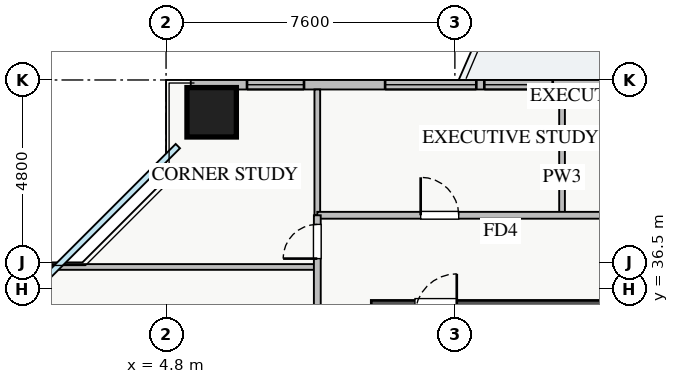
"""IFC4 building model, lengths in metres.
Left out: names, types, materials, properties, quantities, classifications, styles, units other than length and angle.
Written with IfcOpenShell. Run it as: python <this file> out.ifc"""

import sys

from ifc_helpers import new_model, si_unit, direction, frame, frame_2d, origin, origin_2d, place, context, subcontext, project, spatial, rectangle, extrude, source, transform, mapped, element, fill, save


model = new_model("IFC4")
c1 = context("Model", 3, precision=1e-05, world=origin(), true_north=direction((0.0, 1.0)))
c2 = subcontext(c1, "Body", "Model", "MODEL_VIEW")
j1 = project(units=[si_unit("LENGTHUNIT", "METRE"), si_unit("PLANEANGLEUNIT", "RADIAN")], contexts=[c1])
p1 = place(None, origin())
s1 = spatial("IfcSite", under=j1, at=p1, CompositionType="ELEMENT")
p2 = place(p1, origin())
s2 = spatial("IfcBuilding", under=s1, at=p2, CompositionType="ELEMENT")
p3 = place(p2, frame((0.0, 0.0, 69.75)))
s3 = spatial("IfcBuildingStorey", under=s2, at=p3, CompositionType="ELEMENT", Elevation=69.75)
p4 = place(p3, frame((10.2, 35.8, 0.0), z_axis=(0.0, 0.0, 1.0), x_axis=(1.0, 0.0, 0.0)))
e1 = element("IfcWall", 1, at=p4, inside=s3, PredefinedType="SHEAR", context=c2, shape_type="SweptSolid", body=[
    extrude(rectangle(XDim=17.6, YDim=0.8, at=frame_2d((8.8, 0.0))), origin(), (0.0, 0.0, 1.0), 3.25),
])
p5 = place(p4, frame((1.15, 0.0, 0.0)))
e2 = element("IfcOpeningElement", 2, at=p5, cuts=e1, PredefinedType="OPENING", context=c2, shape_type="SweptSolid", body=[
    extrude(rectangle(XDim=1.1, YDim=2.05, at=frame_2d((0.55, 1.025))), frame((0.0, 0.41, 0.0), z_axis=(0.0, -1.0, 0.0), x_axis=(1.0, 0.0, 0.0)), (0.0, 0.0, 1.0), 0.82),
])
p6 = place(p4, frame((8.3, 0.0, 0.0)))
e3 = element("IfcOpeningElement", 3, at=p6, cuts=e1, PredefinedType="OPENING", context=c2, shape_type="SweptSolid", body=[
    extrude(rectangle(XDim=1.1, YDim=2.05, at=frame_2d((0.55, 1.025))), frame((0.0, 0.41, 0.0), z_axis=(0.0, -1.0, 0.0), x_axis=(1.0, 0.0, 0.0)), (0.0, 0.0, 1.0), 0.82),
])
p7 = place(p4, frame((10.05, 0.0, 0.0)))
e4 = element("IfcOpeningElement", 4, at=p7, cuts=e1, PredefinedType="OPENING", context=c2, shape_type="SweptSolid", body=[
    extrude(rectangle(XDim=1.1, YDim=2.05, at=frame_2d((0.55, 1.025))), frame((0.0, 0.41, 0.0), z_axis=(0.0, -1.0, 0.0), x_axis=(1.0, 0.0, 0.0)), (0.0, 0.0, 1.0), 0.82),
])
p8 = place(p4, frame((14.74, 0.0, 0.0)))
e5 = element("IfcOpeningElement", 5, at=p8, cuts=e1, PredefinedType="OPENING", context=c2, shape_type="SweptSolid", body=[
    extrude(rectangle(XDim=1.0, YDim=2.05, at=frame_2d((0.5, 1.025))), frame((0.0, 0.41, 0.0), z_axis=(0.0, -1.0, 0.0), x_axis=(1.0, 0.0, 0.0)), (0.0, 0.0, 1.0), 0.82),
])
p9 = place(p4, frame((11.835, 0.0, 0.0)))
e6 = element("IfcOpeningElement", 6, at=p9, cuts=e1, PredefinedType="OPENING", context=c2, shape_type="SweptSolid", body=[
    extrude(rectangle(XDim=1.0, YDim=2.05, at=frame_2d((0.5, 1.025))), frame((0.0, 0.41, 0.0), z_axis=(0.0, -1.0, 0.0), x_axis=(1.0, 0.0, 0.0)), (0.0, 0.0, 1.0), 0.82),
])
p10 = place(p4, frame((13.37, 0.0, 0.0)))
e7 = element("IfcOpeningElement", 7, at=p10, cuts=e1, PredefinedType="OPENING", context=c2, shape_type="SweptSolid", body=[
    extrude(rectangle(XDim=1.0, YDim=2.05, at=frame_2d((0.5, 1.025))), frame((0.0, 0.41, 0.0), z_axis=(0.0, -1.0, 0.0), x_axis=(1.0, 0.0, 0.0)), (0.0, 0.0, 1.0), 0.82),
])
m1 = source(origin(), c2, "Body", "SweptSolid", [
    extrude(rectangle(XDim=1.3, YDim=1.3, at=origin_2d()), origin(), (0.0, 0.0, 1.0), 3.25),
])
p11 = place(p3, frame((6.0, 41.15, 0.0), z_axis=(0.0, 0.0, 1.0), x_axis=(1.0, 0.0, 0.0)))
e8 = element("IfcColumn", 8, at=p11, inside=s3, PredefinedType="COLUMN", context=c2, shape_type="MappedRepresentation", body=[
    mapped(m1, transform((0.0, 0.0, 0.0), x_axis=(1.0, 0.0, 0.0), y_axis=(0.0, 1.0, 0.0), z_axis=(0.0, 0.0, 1.0), scale=1.0)),
])
p12 = place(p3, frame((5.45, 41.875, 0.0), z_axis=(0.0, 0.0, 1.0), x_axis=(1.0, 0.0, 0.0)))
e9 = element("IfcWall", 9, at=p12, inside=s3, PredefinedType="STANDARD", context=c2, shape_type="SweptSolid", body=[
    extrude(rectangle(XDim=27.1, YDim=0.25, at=frame_2d((13.55, 0.0))), origin(), (0.0, 0.0, 1.0), 2.61),
])
p13 = place(p12, frame((14.4, 0.0, 0.0)))
e10 = element("IfcOpeningElement", 10, at=p13, cuts=e9, PredefinedType="OPENING", context=c2, shape_type="SweptSolid", body=[
    extrude(rectangle(XDim=1.2, YDim=2.1, at=frame_2d((0.6, 1.05))), frame((0.0, 0.135, 0.0), z_axis=(0.0, -1.0, 0.0), x_axis=(1.0, 0.0, 0.0)), (0.0, 0.0, 1.0), 0.27),
])
p14 = place(p12, frame((1.48, 0.0, 0.9)))
e11 = element("IfcOpeningElement", 11, at=p14, cuts=e9, PredefinedType="OPENING", context=c2, shape_type="SweptSolid", body=[
    extrude(rectangle(XDim=1.5, YDim=1.5, at=frame_2d((0.75, 0.75))), frame((0.0, 0.135, 0.0), z_axis=(0.0, -1.0, 0.0), x_axis=(1.0, 0.0, 0.0)), (0.0, 0.0, 1.0), 0.27),
])
p15 = place(p12, frame((7.725, 0.0, 0.9)))
e12 = element("IfcOpeningElement", 12, at=p15, cuts=e9, PredefinedType="OPENING", context=c2, shape_type="SweptSolid", body=[
    extrude(rectangle(XDim=1.8, YDim=1.5, at=frame_2d((0.9, 0.75))), frame((0.0, 0.135, 0.0), z_axis=(0.0, -1.0, 0.0), x_axis=(1.0, 0.0, 0.0)), (0.0, 0.0, 1.0), 0.27),
])
p16 = place(p12, frame((17.92, 0.0, 0.9)))
e13 = element("IfcOpeningElement", 13, at=p16, cuts=e9, PredefinedType="OPENING", context=c2, shape_type="SweptSolid", body=[
    extrude(rectangle(XDim=1.5, YDim=1.5, at=frame_2d((0.75, 0.75))), frame((0.0, 0.135, 0.0), z_axis=(0.0, -1.0, 0.0), x_axis=(1.0, 0.0, 0.0)), (0.0, 0.0, 1.0), 0.27),
])
p17 = place(p12, frame((22.663, 0.0, 0.9)))
e14 = element("IfcOpeningElement", 14, at=p17, cuts=e9, PredefinedType="OPENING", context=c2, shape_type="SweptSolid", body=[
    extrude(rectangle(XDim=2.1, YDim=1.48, at=frame_2d((1.05, 0.74))), frame((0.0, 0.135, 0.0), z_axis=(0.0, -1.0, 0.0), x_axis=(1.0, 0.0, 0.0)), (0.0, 0.0, 1.0), 0.27),
])
p18 = place(p12, frame((5.114, 0.0, 0.9)))
e15 = element("IfcOpeningElement", 15, at=p18, cuts=e9, PredefinedType="OPENING", context=c2, shape_type="SweptSolid", body=[
    extrude(rectangle(XDim=2.4, YDim=1.5, at=frame_2d((1.2, 0.75))), frame((0.0, 0.135, 0.0), z_axis=(0.0, -1.0, 0.0), x_axis=(1.0, 0.0, 0.0)), (0.0, 0.0, 1.0), 0.27),
])
p19 = place(p12, frame((10.893, 0.0, 0.9)))
e16 = element("IfcOpeningElement", 16, at=p19, cuts=e9, PredefinedType="OPENING", context=c2, shape_type="SweptSolid", body=[
    extrude(rectangle(XDim=2.4, YDim=1.5, at=frame_2d((1.2, 0.75))), frame((0.0, 0.135, 0.0), z_axis=(0.0, -1.0, 0.0), x_axis=(1.0, 0.0, 0.0)), (0.0, 0.0, 1.0), 0.27),
])
for number, where, z_axis, x_axis in (
    (17, (15.22, 38.44, 0.0), (0.0, 0.0, 1.0), (0.0, 1.0, 0.0)),
    (18, (8.78, 38.44, 0.0), (0.0, 0.0, 1.0), (0.0, 1.0, 0.0)),
):
    element("IfcWall", number, at=place(p3, frame(where, z_axis=z_axis, x_axis=x_axis)), inside=s3, PredefinedType="PARTITIONING", context=c2, shape_type="SweptSolid", body=[
        extrude(rectangle(XDim=3.31, YDim=0.15, at=frame_2d((1.655, 0.0))), origin(), (0.0, 0.0, 1.0), 3.07),
    ])
p20 = place(p3, frame((8.78, 38.44, 0.0), z_axis=(0.0, 0.0, 1.0), x_axis=(1.0, 0.0, 0.0)))
e19 = element("IfcWall", 19, at=p20, inside=s3, PredefinedType="PARTITIONING", context=c2, shape_type="SweptSolid", body=[
    extrude(rectangle(XDim=23.54, YDim=0.18, at=frame_2d((11.77, 0.0))), origin(), (0.0, 0.0, 1.0), 3.07),
])
p21 = place(p20, frame((2.72, 0.0, 0.0)))
e20 = element("IfcOpeningElement", 20, at=p21, cuts=e19, PredefinedType="OPENING", context=c2, shape_type="SweptSolid", body=[
    extrude(rectangle(XDim=1.0, YDim=2.05, at=frame_2d((0.5, 1.025))), frame((0.0, 0.1, 0.0), z_axis=(0.0, -1.0, 0.0), x_axis=(1.0, 0.0, 0.0)), (0.0, 0.0, 1.0), 0.2),
])
p22 = place(p20, frame((9.23, 0.0, 0.0)))
e21 = element("IfcOpeningElement", 21, at=p22, cuts=e19, PredefinedType="OPENING", context=c2, shape_type="SweptSolid", body=[
    extrude(rectangle(XDim=1.0, YDim=2.05, at=frame_2d((0.5, 1.025))), frame((0.0, 0.1, 0.0), z_axis=(0.0, -1.0, 0.0), x_axis=(1.0, 0.0, 0.0)), (0.0, 0.0, 1.0), 0.2),
])
p23 = place(p20, frame((14.84, 0.0, 0.0)))
e22 = element("IfcOpeningElement", 22, at=p23, cuts=e19, PredefinedType="OPENING", context=c2, shape_type="SweptSolid", body=[
    extrude(rectangle(XDim=1.0, YDim=2.05, at=frame_2d((0.5, 1.025))), frame((0.0, 0.1, 0.0), z_axis=(0.0, -1.0, 0.0), x_axis=(1.0, 0.0, 0.0)), (0.0, 0.0, 1.0), 0.2),
])
p24 = place(p20, frame((20.1, 0.0, 0.0)))
e23 = element("IfcOpeningElement", 23, at=p24, cuts=e19, PredefinedType="OPENING", context=c2, shape_type="SweptSolid", body=[
    extrude(rectangle(XDim=1.0, YDim=2.05, at=frame_2d((0.5, 1.025))), frame((0.0, 0.1, 0.0), z_axis=(0.0, -1.0, 0.0), x_axis=(1.0, 0.0, 0.0)), (0.0, 0.0, 1.0), 0.2),
])
p25 = place(p3, frame((0.25, 37.08, 0.0), z_axis=(0.0, 0.0, 1.0), x_axis=(1.0, 0.0, 0.0)))
e24 = element("IfcWall", 24, at=p25, inside=s3, PredefinedType="PARTITIONING", context=c2, shape_type="SweptSolid", body=[
    extrude(rectangle(XDim=8.53, YDim=0.15, at=frame_2d((4.265, 0.0))), origin(), (0.0, 0.0, 1.0), 3.07),
])
p26 = place(p3, frame((8.78, 7.21, 0.0), z_axis=(0.0, 0.0, 1.0), x_axis=(0.0, 1.0, 0.0)))
e25 = element("IfcWall", 25, at=p26, inside=s3, PredefinedType="PARTITIONING", context=c2, shape_type="SweptSolid", body=[
    extrude(rectangle(XDim=31.23, YDim=0.18, at=frame_2d((15.615, 0.0))), origin(), (0.0, 0.0, 1.0), 3.07),
])
p27 = place(p26, frame((30.09, 0.0, 0.0)))
e26 = element("IfcOpeningElement", 26, at=p27, cuts=e25, PredefinedType="OPENING", context=c2, shape_type="SweptSolid", body=[
    extrude(rectangle(XDim=0.9, YDim=2.05, at=frame_2d((0.45, 1.025))), frame((0.0, 0.1, 0.0), z_axis=(0.0, -1.0, 0.0), x_axis=(1.0, 0.0, 0.0)), (0.0, 0.0, 1.0), 0.2),
])
p28 = place(p26, frame((0.24, 0.0, 0.0)))
e27 = element("IfcOpeningElement", 27, at=p28, cuts=e25, PredefinedType="OPENING", context=c2, shape_type="SweptSolid", body=[
    extrude(rectangle(XDim=0.9, YDim=2.05, at=frame_2d((0.45, 1.025))), frame((0.0, 0.1, 0.0), z_axis=(0.0, -1.0, 0.0), x_axis=(1.0, 0.0, 0.0)), (0.0, 0.0, 1.0), 0.2),
])
p29 = place(p26, frame((2.84, 0.0, 0.0)))
e28 = element("IfcOpeningElement", 28, at=p29, cuts=e25, PredefinedType="OPENING", context=c2, shape_type="SweptSolid", body=[
    extrude(rectangle(XDim=1.0, YDim=2.05, at=frame_2d((0.5, 1.025))), frame((0.0, 0.1, 0.0), z_axis=(0.0, -1.0, 0.0), x_axis=(1.0, 0.0, 0.0)), (0.0, 0.0, 1.0), 0.2),
])
p30 = place(p26, frame((12.11, 0.0, 0.0)))
e29 = element("IfcOpeningElement", 29, at=p30, cuts=e25, PredefinedType="OPENING", context=c2, shape_type="SweptSolid", body=[
    extrude(rectangle(XDim=1.0, YDim=2.05, at=frame_2d((0.5, 1.025))), frame((0.0, 0.1, 0.0), z_axis=(0.0, -1.0, 0.0), x_axis=(1.0, 0.0, 0.0)), (0.0, 0.0, 1.0), 0.2),
])
p31 = place(p26, frame((24.62, 0.0, 0.0)))
e30 = element("IfcOpeningElement", 30, at=p31, cuts=e25, PredefinedType="OPENING", context=c2, shape_type="SweptSolid", body=[
    extrude(rectangle(XDim=1.0, YDim=2.05, at=frame_2d((0.5, 1.025))), frame((0.0, 0.1, 0.0), z_axis=(0.0, -1.0, 0.0), x_axis=(1.0, 0.0, 0.0)), (0.0, 0.0, 1.0), 0.2),
])
m2 = source(origin(), c2, "Body", "SweptSolid", [
    extrude(rectangle(XDim=1.5, YDim=1.5, at=frame_2d((0.75, 0.75))), frame((0.0, 0.03, 0.0), z_axis=(0.0, -1.0, 0.0), x_axis=(1.0, 0.0, 0.0)), (0.0, 0.0, 1.0), 0.06),
])
p32 = place(p14, origin())
e31 = element("IfcWindow", 31, at=p32, inside=s3, PartitioningType="TRIPLE_PANEL_VERTICAL", PredefinedType="WINDOW", context=c2, shape_type="MappedRepresentation", body=[
    mapped(m2, transform((0.0, 0.0, 0.0), x_axis=(1.0, 0.0, 0.0), y_axis=(0.0, 1.0, 0.0), z_axis=(0.0, 0.0, 1.0), scale=1.0)),
])
fill(e11, e31)
m3 = source(origin(), c2, "Body", "SweptSolid", [
    extrude(rectangle(XDim=1.8, YDim=1.5, at=frame_2d((0.9, 0.75))), frame((0.0, 0.03, 0.0), z_axis=(0.0, -1.0, 0.0), x_axis=(1.0, 0.0, 0.0)), (0.0, 0.0, 1.0), 0.06),
])
p33 = place(p15, origin())
e32 = element("IfcWindow", 32, at=p33, inside=s3, PartitioningType="DOUBLE_PANEL_VERTICAL", PredefinedType="WINDOW", context=c2, shape_type="MappedRepresentation", body=[
    mapped(m3, transform((0.0, 0.0, 0.0), x_axis=(1.0, 0.0, 0.0), y_axis=(0.0, 1.0, 0.0), z_axis=(0.0, 0.0, 1.0), scale=1.0)),
])
fill(e12, e32)
m4 = source(origin(), c2, "Body", "SweptSolid", [
    extrude(rectangle(XDim=1.0, YDim=2.05, at=frame_2d((0.5, 1.025))), frame((0.0, 0.025, 0.0), z_axis=(0.0, -1.0, 0.0), x_axis=(1.0, 0.0, 0.0)), (0.0, 0.0, 1.0), 0.05),
])
p34 = place(p21, origin())
e33 = element("IfcDoor", 33, at=p34, inside=s3, OperationType="SINGLE_SWING_LEFT", PredefinedType="DOOR", context=c2, shape_type="MappedRepresentation", body=[
    mapped(m4, transform((0.0, 0.0, 0.0), x_axis=(1.0, 0.0, 0.0), y_axis=(0.0, 1.0, 0.0), z_axis=(0.0, 0.0, 1.0), scale=1.0)),
])
fill(e20, e33)
m5 = source(origin(), c2, "Body", "SweptSolid", [
    extrude(rectangle(XDim=0.9, YDim=2.05, at=frame_2d((0.45, 1.025))), frame((0.0, 0.025, 0.0), z_axis=(0.0, -1.0, 0.0), x_axis=(1.0, 0.0, 0.0)), (0.0, 0.0, 1.0), 0.05),
])
p35 = place(p27, origin())
e34 = element("IfcDoor", 34, at=p35, inside=s3, OperationType="SINGLE_SWING_LEFT", PredefinedType="DOOR", context=c2, shape_type="MappedRepresentation", body=[
    mapped(m5, transform((0.0, 0.0, 0.0), x_axis=(1.0, 0.0, 0.0), y_axis=(0.0, 1.0, 0.0), z_axis=(0.0, 0.0, 1.0), scale=1.0)),
])
fill(e26, e34)
m6 = source(origin(), c2, "Body", "SweptSolid", [
    extrude(rectangle(XDim=2.4, YDim=1.5, at=frame_2d((1.2, 0.75))), frame((0.0, 0.03, 0.0), z_axis=(0.0, -1.0, 0.0), x_axis=(1.0, 0.0, 0.0)), (0.0, 0.0, 1.0), 0.06),
])
p36 = place(p18, origin())
e35 = element("IfcWindow", 35, at=p36, inside=s3, PartitioningType="TRIPLE_PANEL_VERTICAL", PredefinedType="WINDOW", context=c2, shape_type="MappedRepresentation", body=[
    mapped(m6, transform((0.0, 0.0, 0.0), x_axis=(1.0, 0.0, 0.0), y_axis=(0.0, 1.0, 0.0), z_axis=(0.0, 0.0, 1.0), scale=1.0)),
])
fill(e15, e35)
save(model, sys.argv[1])
